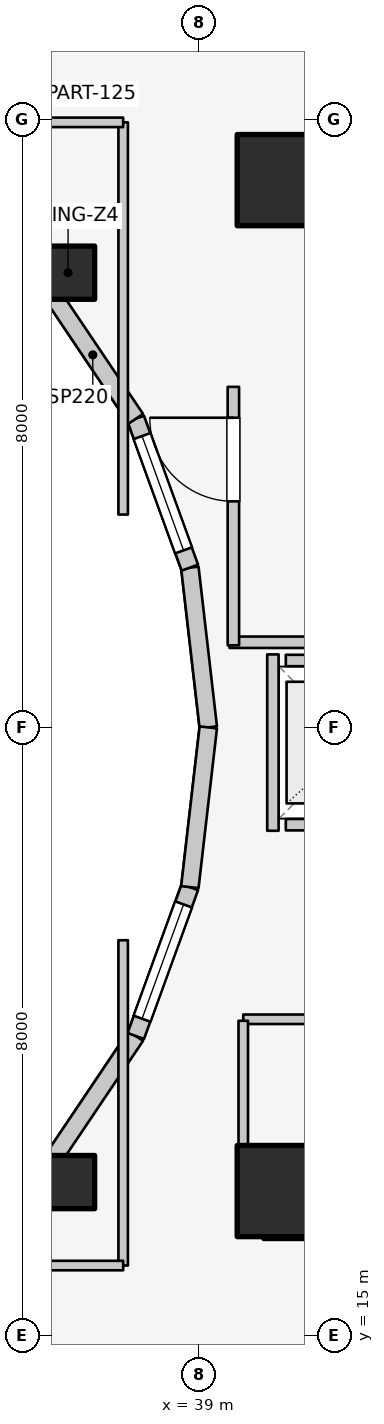
"""IFC4 building model, lengths in metres.
Left out: names, types, materials, properties, quantities, classifications, styles, units other than length and angle.
Written with IfcOpenShell. Run it as: python <this file> out.ifc"""

import sys

from ifc_helpers import new_model, si_unit, direction, frame, frame_2d, origin, origin_2d, place, context, subcontext, project, spatial, rectangle, extrude, element, fill, save


model = new_model("IFC4")
c1 = context("Model", 3, precision=1e-05, world=origin(), true_north=direction((0.0, 1.0)))
c2 = subcontext(c1, "Body", "Model", "MODEL_VIEW")
j1 = project(units=[si_unit("LENGTHUNIT", "METRE"), si_unit("PLANEANGLEUNIT", "RADIAN")], contexts=[c1])
p1 = place(None, origin())
s1 = spatial("IfcSite", under=j1, at=p1, CompositionType="ELEMENT")
p2 = place(p1, origin())
s2 = spatial("IfcBuilding", under=s1, at=p2, CompositionType="ELEMENT")
p3 = place(p2, frame((0.0, 0.0, 220.2)))
s3 = spatial("IfcBuildingStorey", under=s2, at=p3, CompositionType="ELEMENT", Elevation=220.2)
for number, where, z_axis, x_axis in (
    (1, (39.85, 16.55, 0.0), (0.0, 0.0, 1.0), (1.0, 0.0, 0.0)),
    (2, (39.85, 30.35, 0.0), (0.0, 0.0, 1.0), (1.0, 0.0, 0.0)),
):
    element("IfcWall", number, at=place(p3, frame(where, z_axis=z_axis, x_axis=x_axis)), inside=s3, PredefinedType="SHEAR", context=c2, shape_type="SweptSolid", body=[
        extrude(rectangle(XDim=4.5, YDim=0.55, at=frame_2d((2.25, 0.0))), origin(), (0.0, 0.0, 1.0), 3.1),
    ])
for number, where, z_axis, x_axis in (
    (3, (40.1, 16.9, 0.0), (0.0, 0.0, 1.0), (1.0, 0.0, 0.0)),
    (4, (40.1, 30.2, 0.0), (0.0, 0.0, 1.0), (1.0, 0.0, 0.0)),
):
    element("IfcColumn", number, at=place(p3, frame(where, z_axis=z_axis, x_axis=x_axis)), inside=s3, PredefinedType="COLUMN", context=c2, shape_type="SweptSolid", body=[
        extrude(rectangle(XDim=1.2, YDim=1.2, at=origin_2d()), origin(), (0.0, 0.0, 1.0), 3.1),
    ])
for number, where, z_axis, x_axis in (
    (5, (37.275, 28.982, 0.0), (0.0, 0.0, 1.0), (1.0, 0.0, 0.0)),
    (6, (37.275, 17.018, 0.0), (0.0, 0.0, 1.0), (1.0, 0.0, 0.0)),
):
    element("IfcColumn", number, at=place(p3, frame(where, z_axis=z_axis, x_axis=x_axis)), inside=s3, PredefinedType="COLUMN", context=c2, shape_type="SweptSolid", body=[
        extrude(rectangle(XDim=0.7, YDim=0.7, at=origin_2d()), origin(), (0.0, 0.0, 1.0), 3.1),
    ])
p4 = place(p3, frame((39.12, 23.0, 0.0), z_axis=(0.0, 0.0, 1.0), x_axis=(-0.114711713601, 0.993398823617, 0.0)))
e7 = element("IfcWall", 7, at=p4, inside=s3, PredefinedType="STANDARD", context=c2, shape_type="SweptSolid", body=[
    extrude(rectangle(XDim=2.115, YDim=0.23, at=frame_2d((1.058, 0.0))), origin(), (0.0, 0.0, 1.0), 2.84),
])
p5 = place(p3, frame((38.877, 25.102, 0.0), z_axis=(0.0, 0.0, 1.0), x_axis=(-0.341423187295, 0.93990968033, 0.0)))
e8 = element("IfcWall", 8, at=p5, inside=s3, PredefinedType="STANDARD", context=c2, shape_type="SweptSolid", body=[
    extrude(rectangle(XDim=2.084, YDim=0.23, at=frame_2d((1.042, 0.0))), origin(), (0.0, 0.0, 1.0), 2.84),
])
p6 = place(p5, frame((0.242, 0.0, 0.85)))
e9 = element("IfcOpeningElement", 9, at=p6, cuts=e8, PredefinedType="OPENING", context=c2, shape_type="SweptSolid", body=[
    extrude(rectangle(XDim=1.6, YDim=1.65, at=frame_2d((0.8, 0.825))), frame((0.0, 0.125, 0.0), z_axis=(0.0, -1.0, 0.0), x_axis=(1.0, 0.0, 0.0)), (0.0, 0.0, 1.0), 0.25),
])
p7 = place(p3, frame((38.166, 27.06, 0.0), z_axis=(0.0, 0.0, 1.0), x_axis=(-0.558197800898, 0.829707909492, 0.0)))
e10 = element("IfcWall", 10, at=p7, inside=s3, PredefinedType="STANDARD", context=c2, shape_type="SweptSolid", body=[
    extrude(rectangle(XDim=2.027, YDim=0.23, at=frame_2d((1.013, 0.0))), origin(), (0.0, 0.0, 1.0), 2.16),
])
for number, where, z_axis, x_axis in (
    (11, (37.035, 28.742, 0.0), (0.0, 0.0, 1.0), (-0.753, 0.659, 0.0)),
    (12, (35.56, 15.968, 0.0), (0.0, 0.0, 1.0), (0.753, 0.659, 0.0)),
):
    element("IfcWall", number, at=place(p3, frame(where, z_axis=z_axis, x_axis=x_axis)), inside=s3, PredefinedType="STANDARD", context=c2, shape_type="SweptSolid", body=[
        extrude(rectangle(XDim=1.959, YDim=0.23, at=frame_2d((0.98, 0.0))), origin(), (0.0, 0.0, 1.0), 2.16),
    ])
p8 = place(p3, frame((37.035, 17.258, 0.0), z_axis=(0.0, 0.0, 1.0), x_axis=(0.558197800898, 0.829707909492, 0.0)))
e13 = element("IfcWall", 13, at=p8, inside=s3, PredefinedType="STANDARD", context=c2, shape_type="SweptSolid", body=[
    extrude(rectangle(XDim=2.027, YDim=0.23, at=frame_2d((1.013, 0.0))), origin(), (0.0, 0.0, 1.0), 2.16),
])
p9 = place(p3, frame((38.166, 18.94, 0.0), z_axis=(0.0, 0.0, 1.0), x_axis=(0.341423187295, 0.93990968033, 0.0)))
e14 = element("IfcWall", 14, at=p9, inside=s3, PredefinedType="STANDARD", context=c2, shape_type="SweptSolid", body=[
    extrude(rectangle(XDim=2.084, YDim=0.23, at=frame_2d((1.042, 0.0))), origin(), (0.0, 0.0, 1.0), 2.84),
])
p10 = place(p9, frame((0.242, 0.0, 0.85)))
e15 = element("IfcOpeningElement", 15, at=p10, cuts=e14, PredefinedType="OPENING", context=c2, shape_type="SweptSolid", body=[
    extrude(rectangle(XDim=1.6, YDim=1.65, at=frame_2d((0.8, 0.825))), frame((0.0, 0.125, 0.0), z_axis=(0.0, -1.0, 0.0), x_axis=(1.0, 0.0, 0.0)), (0.0, 0.0, 1.0), 0.25),
])
p11 = place(p3, frame((38.877, 20.898, 0.0), z_axis=(0.0, 0.0, 1.0), x_axis=(0.114711713601, 0.993398823617, 0.0)))
e16 = element("IfcWall", 16, at=p11, inside=s3, PredefinedType="STANDARD", context=c2, shape_type="SweptSolid", body=[
    extrude(rectangle(XDim=2.115, YDim=0.23, at=frame_2d((1.058, 0.0))), origin(), (0.0, 0.0, 1.0), 2.84),
])
p12 = place(p3, frame((40.14, 21.72, 0.0), z_axis=(0.0, 0.0, 1.0), x_axis=(1.0, 0.0, 0.0)))
e17 = element("IfcWall", 17, at=p12, inside=s3, PredefinedType="SOLIDWALL", context=c2, shape_type="SweptSolid", body=[
    extrude(rectangle(XDim=1.82, YDim=0.15, at=frame_2d((0.91, 0.0))), origin(), (0.0, 0.0, 1.0), 2.12),
])
p13 = place(p12, frame((0.36, 0.0, 0.0)))
e18 = element("IfcOpeningElement", 18, at=p13, cuts=e17, PredefinedType="OPENING", context=c2, shape_type="SweptSolid", body=[
    extrude(rectangle(XDim=1.1, YDim=2.1, at=frame_2d((0.55, 1.05))), frame((0.0, 0.085, 0.0), z_axis=(0.0, -1.0, 0.0), x_axis=(1.0, 0.0, 0.0)), (0.0, 0.0, 1.0), 0.17),
])
p14 = place(p3, frame((40.14, 23.88, 0.0), z_axis=(0.0, 0.0, 1.0), x_axis=(1.0, 0.0, 0.0)))
e19 = element("IfcWall", 19, at=p14, inside=s3, PredefinedType="SOLIDWALL", context=c2, shape_type="SweptSolid", body=[
    extrude(rectangle(XDim=1.82, YDim=0.15, at=frame_2d((0.91, 0.0))), origin(), (0.0, 0.0, 1.0), 2.12),
])
p15 = place(p3, frame((39.97, 21.64, 0.0), z_axis=(0.0, 0.0, 1.0), x_axis=(0.0, 1.0, 0.0)))
e20 = element("IfcWall", 20, at=p15, inside=s3, PredefinedType="SOLIDWALL", context=c2, shape_type="SweptSolid", body=[
    extrude(rectangle(XDim=2.32, YDim=0.15, at=frame_2d((1.16, 0.0))), origin(), (0.0, 0.0, 1.0), 2.12),
])
p16 = place(p3, frame((39.4, 24.12, 0.0), z_axis=(0.0, 0.0, 1.0), x_axis=(1.0, 0.0, 0.0)))
e21 = element("IfcWall", 21, at=p16, inside=s3, PredefinedType="PARTITIONING", context=c2, shape_type="SweptSolid", body=[
    extrude(rectangle(XDim=5.08, YDim=0.15, at=frame_2d((2.54, 0.0))), origin(), (0.0, 0.0, 1.0), 2.12),
])
p17 = place(p3, frame((39.45, 24.08, 0.0), z_axis=(0.0, 0.0, 1.0), x_axis=(0.0, 1.0, 0.0)))
e22 = element("IfcWall", 22, at=p17, inside=s3, PredefinedType="PARTITIONING", context=c2, shape_type="SweptSolid", body=[
    extrude(rectangle(XDim=3.4, YDim=0.15, at=frame_2d((1.7, 0.0))), origin(), (0.0, 0.0, 1.0), 2.855),
])
p18 = place(p17, frame((1.894, 0.0, 0.0)))
e23 = element("IfcOpeningElement", 23, at=p18, cuts=e22, PredefinedType="OPENING", context=c2, shape_type="SweptSolid", body=[
    extrude(rectangle(XDim=1.1, YDim=2.1, at=frame_2d((0.55, 1.05))), frame((0.0, 0.085, 0.0), z_axis=(0.0, -1.0, 0.0), x_axis=(1.0, 0.0, 0.0)), (0.0, 0.0, 1.0), 0.17),
])
p19 = place(p3, frame((39.58, 19.16, 0.0), z_axis=(0.0, 0.0, 1.0), x_axis=(1.0, 0.0, 0.0)))
e24 = element("IfcWall", 24, at=p19, inside=s3, PredefinedType="PARTITIONING", context=c2, shape_type="SweptSolid", body=[
    extrude(rectangle(XDim=4.87, YDim=0.125, at=frame_2d((2.435, 0.0))), origin(), (0.0, 0.0, 1.0), 2.12),
])
p20 = place(p19, frame((1.748, 0.0, 0.0)))
e25 = element("IfcOpeningElement", 25, at=p20, cuts=e24, PredefinedType="OPENING", context=c2, shape_type="SweptSolid", body=[
    extrude(rectangle(XDim=0.85, YDim=2.05, at=frame_2d((0.425, 1.025))), frame((0.0, 0.073, 0.0), z_axis=(0.0, -1.0, 0.0), x_axis=(1.0, 0.0, 0.0)), (0.0, 0.0, 1.0), 0.145),
])
p21 = place(p3, frame((39.58, 17.1, 0.0), z_axis=(0.0, 0.0, 1.0), x_axis=(0.0, 1.0, 0.0)))
e26 = element("IfcWall", 26, at=p21, inside=s3, PredefinedType="PARTITIONING", context=c2, shape_type="SweptSolid", body=[
    extrude(rectangle(XDim=2.04, YDim=0.125, at=frame_2d((1.02, 0.0))), origin(), (0.0, 0.0, 1.0), 2.232),
])
p22 = place(p3, frame((35.55, 30.015, 0.0), z_axis=(0.0, 0.0, 1.0), x_axis=(0.523992004803, 0.851723182086, 0.0)))
e27 = element("IfcWall", 27, at=p22, inside=s3, PredefinedType="PARTITIONING", context=c2, shape_type="SweptSolid", body=[
    extrude(rectangle(XDim=3.101, YDim=0.125, at=frame_2d((1.551, 0.0))), origin(), (0.0, 0.0, 1.0), 2.376),
])
p23 = place(p3, frame((38.0, 25.8, 0.0), z_axis=(0.0, 0.0, 1.0), x_axis=(0.0, 1.0, 0.0)))
e28 = element("IfcWall", 28, at=p23, inside=s3, PredefinedType="PARTITIONING", context=c2, shape_type="SweptSolid", body=[
    extrude(rectangle(XDim=5.16, YDim=0.125, at=frame_2d((2.58, 0.0))), origin(), (0.0, 0.0, 1.0), 2.232),
])
p24 = place(p3, frame((35.4, 30.96, 0.0), z_axis=(0.0, 0.0, 1.0), x_axis=(1.0, 0.0, 0.0)))
e29 = element("IfcWall", 29, at=p24, inside=s3, PredefinedType="PARTITIONING", context=c2, shape_type="SweptSolid", body=[
    extrude(rectangle(XDim=2.6, YDim=0.125, at=frame_2d((1.3, 0.0))), origin(), (0.0, 0.0, 1.0), 2.376),
])
p25 = place(p3, frame((38.0, 15.92, 0.0), z_axis=(0.0, 0.0, 1.0), x_axis=(0.0, 1.0, 0.0)))
e30 = element("IfcWall", 30, at=p25, inside=s3, PredefinedType="PARTITIONING", context=c2, shape_type="SweptSolid", body=[
    extrude(rectangle(XDim=4.28, YDim=0.125, at=frame_2d((2.14, 0.0))), origin(), (0.0, 0.0, 1.0), 2.232),
])
p26 = place(p3, frame((35.4, 15.92, 0.0), z_axis=(0.0, 0.0, 1.0), x_axis=(1.0, 0.0, 0.0)))
e31 = element("IfcWall", 31, at=p26, inside=s3, PredefinedType="PARTITIONING", context=c2, shape_type="SweptSolid", body=[
    extrude(rectangle(XDim=2.6, YDim=0.125, at=frame_2d((1.3, 0.0))), origin(), (0.0, 0.0, 1.0), 2.232),
])
p27 = place(p6, origin())
e32 = element("IfcWindow", 32, at=p27, inside=s3, PartitioningType="SINGLE_PANEL", PredefinedType="WINDOW", context=c2, shape_type="SweptSolid", body=[
    extrude(rectangle(XDim=1.6, YDim=1.65, at=frame_2d((0.8, 0.825))), frame((0.0, 0.03, 0.0), z_axis=(0.0, -1.0, 0.0), x_axis=(1.0, 0.0, 0.0)), (0.0, 0.0, 1.0), 0.06),
])
fill(e9, e32)
p28 = place(p10, origin())
e33 = element("IfcWindow", 33, at=p28, inside=s3, PartitioningType="SINGLE_PANEL", PredefinedType="WINDOW", context=c2, shape_type="SweptSolid", body=[
    extrude(rectangle(XDim=1.6, YDim=1.65, at=frame_2d((0.8, 0.825))), frame((0.0, 0.03, 0.0), z_axis=(0.0, -1.0, 0.0), x_axis=(1.0, 0.0, 0.0)), (0.0, 0.0, 1.0), 0.06),
])
fill(e15, e33)
p29 = place(p18, origin())
e34 = element("IfcDoor", 34, at=p29, inside=s3, OperationType="SINGLE_SWING_RIGHT", PredefinedType="DOOR", context=c2, shape_type="SweptSolid", body=[
    extrude(rectangle(XDim=1.1, YDim=2.1, at=frame_2d((0.55, 1.05))), frame((0.0, 0.025, 0.0), z_axis=(0.0, -1.0, 0.0), x_axis=(1.0, 0.0, 0.0)), (0.0, 0.0, 1.0), 0.05),
])
fill(e23, e34)
save(model, sys.argv[1])
